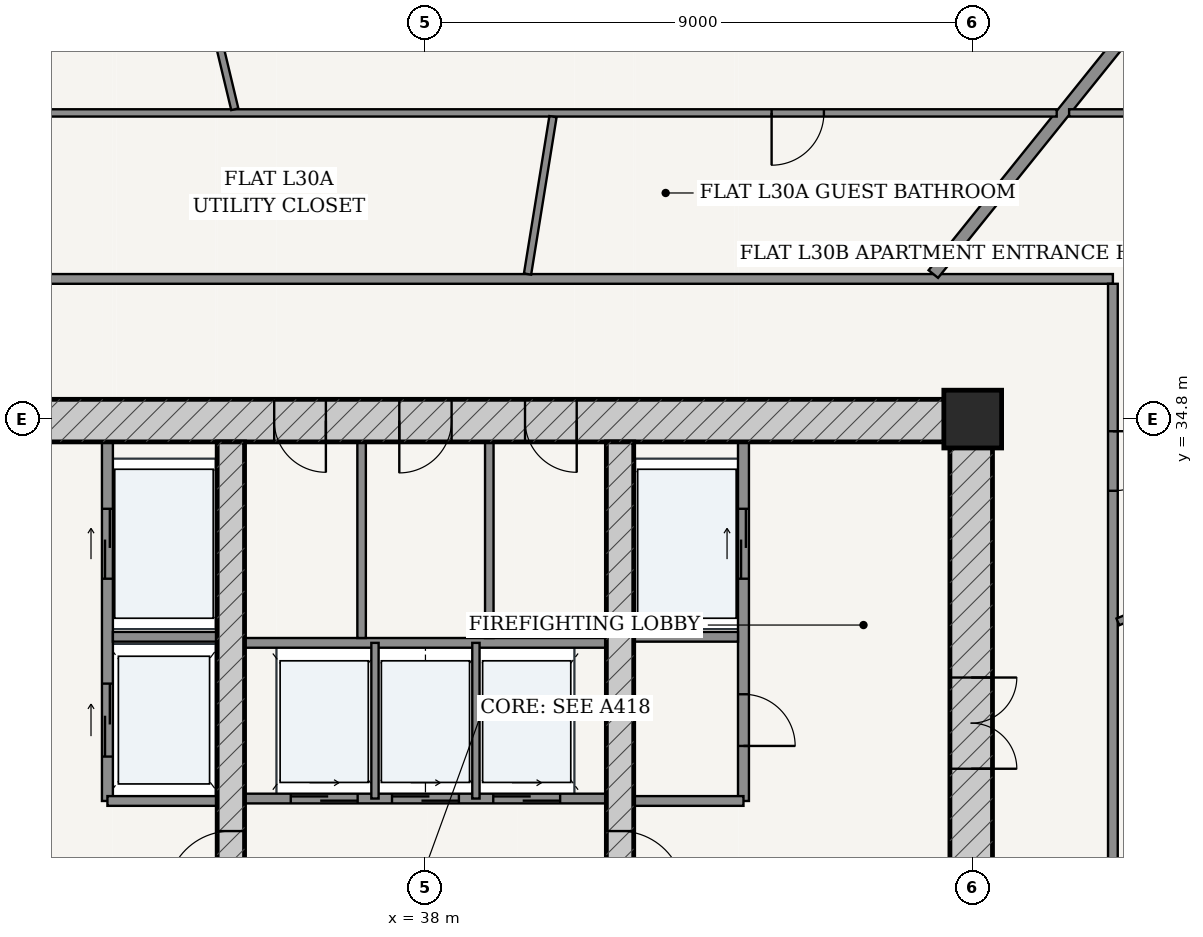
"""IFC4 building model, lengths in metres.
Left out: names, types, materials, properties, quantities, classifications, styles, units other than length and angle.
Written with IfcOpenShell. Run it as: python <this file> out.ifc"""

import sys

from ifc_helpers import new_model, si_unit, direction, frame, frame_2d, origin, origin_2d, place, context, subcontext, project, spatial, rectangle, extrude, source, transform, mapped, element, fill, save


model = new_model("IFC4")
c1 = context("Model", 3, precision=1e-05, world=origin(), true_north=direction((-0.2419218956, 0.970295726276)))
c2 = subcontext(c1, "Body", "Model", "MODEL_VIEW")
j1 = project(units=[si_unit("LENGTHUNIT", "METRE"), si_unit("PLANEANGLEUNIT", "RADIAN")], contexts=[c1])
p1 = place(None, origin())
s1 = spatial("IfcSite", under=j1, at=p1, CompositionType="ELEMENT")
p2 = place(p1, origin())
s2 = spatial("IfcBuilding", under=s1, at=p2, CompositionType="ELEMENT")
p3 = place(p2, frame((0.0, 0.0, 115.8)))
s3 = spatial("IfcBuildingStorey", under=s2, at=p3, CompositionType="ELEMENT", Elevation=115.8)
p4 = place(p3, frame((47.0, 34.8, 0.0), z_axis=(0.0, 0.0, 1.0), x_axis=(1.0, 0.0, 0.0)))
e1 = element("IfcColumn", 1, at=p4, inside=s3, PredefinedType="COLUMN", context=c2, shape_type="SweptSolid", body=[
    extrude(rectangle(XDim=0.95, YDim=0.95, at=origin_2d()), origin(), (0.0, 0.0, 1.0), 3.6),
])
p5 = place(p3, frame((28.675, 34.775, 0.0), z_axis=(0.0, 0.0, 1.0), x_axis=(1.0, 0.0, 0.0)))
e2 = element("IfcWall", 2, at=p5, inside=s3, PredefinedType="SHEAR", context=c2, shape_type="SweptSolid", body=[
    extrude(rectangle(XDim=18.65, YDim=0.7, at=frame_2d((9.325, 0.0))), origin(), (0.0, 0.0, 1.0), 3.325),
])
p6 = place(p5, frame((6.837, 0.0, 0.0)))
e3 = element("IfcOpeningElement", 3, at=p6, cuts=e2, PredefinedType="OPENING", context=c2, shape_type="SweptSolid", body=[
    extrude(rectangle(XDim=0.85, YDim=2.1, at=frame_2d((0.425, 1.05))), frame((0.0, 0.36, 0.0), z_axis=(0.0, -1.0, 0.0), x_axis=(1.0, 0.0, 0.0)), (0.0, 0.0, 1.0), 0.72),
])
p7 = place(p5, frame((8.895, 0.0, 0.0)))
e4 = element("IfcOpeningElement", 4, at=p7, cuts=e2, PredefinedType="OPENING", context=c2, shape_type="SweptSolid", body=[
    extrude(rectangle(XDim=0.86, YDim=2.1, at=frame_2d((0.43, 1.05))), frame((0.0, 0.36, 0.0), z_axis=(0.0, -1.0, 0.0), x_axis=(1.0, 0.0, 0.0)), (0.0, 0.0, 1.0), 0.72),
])
p8 = place(p5, frame((10.962, 0.0, 0.0)))
e5 = element("IfcOpeningElement", 5, at=p8, cuts=e2, PredefinedType="OPENING", context=c2, shape_type="SweptSolid", body=[
    extrude(rectangle(XDim=0.85, YDim=2.1, at=frame_2d((0.425, 1.05))), frame((0.0, 0.36, 0.0), z_axis=(0.0, -1.0, 0.0), x_axis=(1.0, 0.0, 0.0)), (0.0, 0.0, 1.0), 0.72),
])
p9 = place(p3, frame((46.975, 19.175, 0.0), z_axis=(0.0, 0.0, 1.0), x_axis=(0.0, 1.0, 0.0)))
e6 = element("IfcWall", 6, at=p9, inside=s3, PredefinedType="SHEAR", context=c2, shape_type="SweptSolid", body=[
    extrude(rectangle(XDim=15.25, YDim=0.7, at=frame_2d((7.625, 0.0))), origin(), (0.0, 0.0, 1.0), 3.325),
])
p10 = place(p9, frame((9.875, 0.0, 0.0)))
e7 = element("IfcOpeningElement", 7, at=p10, cuts=e6, PredefinedType="OPENING", context=c2, shape_type="SweptSolid", body=[
    extrude(rectangle(XDim=1.5, YDim=2.2, at=frame_2d((0.75, 1.1))), frame((0.0, 0.36, 0.0), z_axis=(0.0, -1.0, 0.0), x_axis=(1.0, 0.0, 0.0)), (0.0, 0.0, 1.0), 0.72),
])
p11 = place(p3, frame((34.8, 19.175, 0.0), z_axis=(0.0, 0.0, 1.0), x_axis=(0.0, 1.0, 0.0)))
e8 = element("IfcWall", 8, at=p11, inside=s3, PredefinedType="SHEAR", context=c2, shape_type="SweptSolid", body=[
    extrude(rectangle(XDim=15.25, YDim=0.45, at=frame_2d((7.625, 0.0))), origin(), (0.0, 0.0, 1.0), 3.325),
])
p12 = place(p11, frame((7.8, 0.0, 0.0)))
e9 = element("IfcOpeningElement", 9, at=p12, cuts=e8, PredefinedType="OPENING", context=c2, shape_type="SweptSolid", body=[
    extrude(rectangle(XDim=1.05, YDim=2.15, at=frame_2d((0.525, 1.075))), frame((0.0, 0.235, 0.0), z_axis=(0.0, -1.0, 0.0), x_axis=(1.0, 0.0, 0.0)), (0.0, 0.0, 1.0), 0.47),
])
p13 = place(p3, frame((41.2, 19.175, 0.0), z_axis=(0.0, 0.0, 1.0), x_axis=(0.0, 1.0, 0.0)))
e10 = element("IfcWall", 10, at=p13, inside=s3, PredefinedType="SHEAR", context=c2, shape_type="SweptSolid", body=[
    extrude(rectangle(XDim=15.25, YDim=0.45, at=frame_2d((7.625, 0.0))), origin(), (0.0, 0.0, 1.0), 3.325),
])
p14 = place(p13, frame((7.8, 0.0, 0.0)))
e11 = element("IfcOpeningElement", 11, at=p14, cuts=e10, PredefinedType="OPENING", context=c2, shape_type="SweptSolid", body=[
    extrude(rectangle(XDim=1.05, YDim=2.15, at=frame_2d((0.525, 1.075))), frame((0.0, 0.235, 0.0), z_axis=(0.0, -1.0, 0.0), x_axis=(1.0, 0.0, 0.0)), (0.0, 0.0, 1.0), 0.47),
])
p15 = place(p3, frame((32.77, 28.52, 0.0), z_axis=(0.0, 0.0, 1.0), x_axis=(0.0, 1.0, 0.0)))
e12 = element("IfcWall", 12, at=p15, inside=s3, PredefinedType="PARTITIONING", context=c2, shape_type="SweptSolid", body=[
    extrude(rectangle(XDim=5.905, YDim=0.18, at=frame_2d((2.953, 0.0))), origin(), (0.0, 0.0, 1.0), 3.325),
])
p16 = place(p15, frame((3.655, 0.0, 0.0)))
e13 = element("IfcOpeningElement", 13, at=p16, cuts=e12, PredefinedType="OPENING", context=c2, shape_type="SweptSolid", body=[
    extrude(rectangle(XDim=1.15, YDim=2.2, at=frame_2d((0.575, 1.1))), frame((0.0, 0.1, 0.0), z_axis=(0.0, -1.0, 0.0), x_axis=(1.0, 0.0, 0.0)), (0.0, 0.0, 1.0), 0.2),
])
p17 = place(p15, frame((0.73, 0.0, 0.0)))
e14 = element("IfcOpeningElement", 14, at=p17, cuts=e12, PredefinedType="OPENING", context=c2, shape_type="SweptSolid", body=[
    extrude(rectangle(XDim=1.2, YDim=2.25, at=frame_2d((0.6, 1.125))), frame((0.0, 0.1, 0.0), z_axis=(0.0, -1.0, 0.0), x_axis=(1.0, 0.0, 0.0)), (0.0, 0.0, 1.0), 0.2),
])
p18 = place(p3, frame((32.86, 31.22, 0.0), z_axis=(0.0, 0.0, 1.0), x_axis=(1.0, 0.0, 0.0)))
e15 = element("IfcWall", 15, at=p18, inside=s3, PredefinedType="PARTITIONING", context=c2, shape_type="SweptSolid", body=[
    extrude(rectangle(XDim=1.715, YDim=0.16, at=frame_2d((0.857, 0.0))), origin(), (0.0, 0.0, 1.0), 3.325),
])
p19 = place(p3, frame((32.77, 28.52, 0.0), z_axis=(0.0, 0.0, 1.0), x_axis=(1.0, 0.0, 0.0)))
e16 = element("IfcWall", 16, at=p19, inside=s3, PredefinedType="PARTITIONING", context=c2, shape_type="SweptSolid", body=[
    extrude(rectangle(XDim=1.805, YDim=0.16, at=frame_2d((0.902, 0.0))), origin(), (0.0, 0.0, 1.0), 3.325),
])
p20 = place(p3, frame((43.23, 28.52, 0.0), z_axis=(0.0, 0.0, 1.0), x_axis=(0.0, 1.0, 0.0)))
e17 = element("IfcWall", 17, at=p20, inside=s3, PredefinedType="PARTITIONING", context=c2, shape_type="SweptSolid", body=[
    extrude(rectangle(XDim=5.905, YDim=0.18, at=frame_2d((2.953, 0.0))), origin(), (0.0, 0.0, 1.0), 3.325),
])
p21 = place(p20, frame((0.905, 0.0, 0.0)))
e18 = element("IfcOpeningElement", 18, at=p21, cuts=e17, PredefinedType="OPENING", context=c2, shape_type="SweptSolid", body=[
    extrude(rectangle(XDim=0.85, YDim=2.1, at=frame_2d((0.425, 1.05))), frame((0.0, 0.1, 0.0), z_axis=(0.0, -1.0, 0.0), x_axis=(1.0, 0.0, 0.0)), (0.0, 0.0, 1.0), 0.2),
])
p22 = place(p20, frame((3.655, 0.0, 0.0)))
e19 = element("IfcOpeningElement", 19, at=p22, cuts=e17, PredefinedType="OPENING", context=c2, shape_type="SweptSolid", body=[
    extrude(rectangle(XDim=1.15, YDim=2.2, at=frame_2d((0.575, 1.1))), frame((0.0, 0.1, 0.0), z_axis=(0.0, -1.0, 0.0), x_axis=(1.0, 0.0, 0.0)), (0.0, 0.0, 1.0), 0.2),
])
p23 = place(p3, frame((41.425, 31.22, 0.0), z_axis=(0.0, 0.0, 1.0), x_axis=(1.0, 0.0, 0.0)))
e20 = element("IfcWall", 20, at=p23, inside=s3, PredefinedType="PARTITIONING", context=c2, shape_type="SweptSolid", body=[
    extrude(rectangle(XDim=1.715, YDim=0.16, at=frame_2d((0.857, 0.0))), origin(), (0.0, 0.0, 1.0), 3.325),
])
p24 = place(p3, frame((41.425, 28.52, 0.0), z_axis=(0.0, 0.0, 1.0), x_axis=(1.0, 0.0, 0.0)))
e21 = element("IfcWall", 21, at=p24, inside=s3, PredefinedType="PARTITIONING", context=c2, shape_type="SweptSolid", body=[
    extrude(rectangle(XDim=1.805, YDim=0.16, at=frame_2d((0.902, 0.0))), origin(), (0.0, 0.0, 1.0), 3.325),
])
p25 = place(p3, frame((35.025, 28.56, 0.0), z_axis=(0.0, 0.0, 1.0), x_axis=(1.0, 0.0, 0.0)))
e22 = element("IfcWall", 22, at=p25, inside=s3, PredefinedType="PARTITIONING", context=c2, shape_type="SweptSolid", body=[
    extrude(rectangle(XDim=5.95, YDim=0.16, at=frame_2d((2.975, 0.0))), origin(), (0.0, 0.0, 1.0), 3.325),
])
p26 = place(p25, frame((0.76, 0.0, 0.0)))
e23 = element("IfcOpeningElement", 23, at=p26, cuts=e22, PredefinedType="OPENING", context=c2, shape_type="SweptSolid", body=[
    extrude(rectangle(XDim=1.1, YDim=2.2, at=frame_2d((0.55, 1.1))), frame((0.0, 0.09, 0.0), z_axis=(0.0, -1.0, 0.0), x_axis=(1.0, 0.0, 0.0)), (0.0, 0.0, 1.0), 0.18),
])
p27 = place(p25, frame((2.425, 0.0, 0.0)))
e24 = element("IfcOpeningElement", 24, at=p27, cuts=e22, PredefinedType="OPENING", context=c2, shape_type="SweptSolid", body=[
    extrude(rectangle(XDim=1.1, YDim=2.2, at=frame_2d((0.55, 1.1))), frame((0.0, 0.09, 0.0), z_axis=(0.0, -1.0, 0.0), x_axis=(1.0, 0.0, 0.0)), (0.0, 0.0, 1.0), 0.18),
])
p28 = place(p25, frame((4.09, 0.0, 0.0)))
e25 = element("IfcOpeningElement", 25, at=p28, cuts=e22, PredefinedType="OPENING", context=c2, shape_type="SweptSolid", body=[
    extrude(rectangle(XDim=1.1, YDim=2.2, at=frame_2d((0.55, 1.1))), frame((0.0, 0.09, 0.0), z_axis=(0.0, -1.0, 0.0), x_axis=(1.0, 0.0, 0.0)), (0.0, 0.0, 1.0), 0.18),
])
p29 = place(p3, frame((35.025, 31.12, 0.0), z_axis=(0.0, 0.0, 1.0), x_axis=(1.0, 0.0, 0.0)))
e26 = element("IfcWall", 26, at=p29, inside=s3, PredefinedType="PARTITIONING", context=c2, shape_type="SweptSolid", body=[
    extrude(rectangle(XDim=5.95, YDim=0.16, at=frame_2d((2.975, 0.0))), origin(), (0.0, 0.0, 1.0), 3.325),
])
for number, where, z_axis, x_axis in (
    (27, (37.17, 28.56, 0.0), (0.0, 0.0, 1.0), (0.0, 1.0, 0.0)),
    (28, (38.83, 28.56, 0.0), (0.0, 0.0, 1.0), (0.0, 1.0, 0.0)),
):
    element("IfcWall", number, at=place(p3, frame(where, z_axis=z_axis, x_axis=x_axis)), inside=s3, PredefinedType="PARTITIONING", context=c2, shape_type="SweptSolid", body=[
        extrude(rectangle(XDim=2.56, YDim=0.12, at=frame_2d((1.28, 0.0))), origin(), (0.0, 0.0, 1.0), 3.325),
    ])
for number, where, z_axis, x_axis in (
    (29, (36.95, 31.2, 0.0), (0.0, 0.0, 1.0), (0.0, 1.0, 0.0)),
    (30, (39.05, 31.2, 0.0), (0.0, 0.0, 1.0), (0.0, 1.0, 0.0)),
):
    element("IfcWall", number, at=place(p3, frame(where, z_axis=z_axis, x_axis=x_axis)), inside=s3, PredefinedType="PARTITIONING", context=c2, shape_type="SweptSolid", body=[
        extrude(rectangle(XDim=3.225, YDim=0.14, at=frame_2d((1.613, 0.0))), origin(), (0.0, 0.0, 1.0), 3.325),
    ])
p30 = place(p3, frame((26.695, 37.105, 0.0), z_axis=(0.0, 0.0, 1.0), x_axis=(1.0, 0.0, 0.0)))
e31 = element("IfcWall", 31, at=p30, inside=s3, PredefinedType="PARTITIONING", context=c2, shape_type="SweptSolid", body=[
    extrude(rectangle(XDim=22.61, YDim=0.16, at=frame_2d((11.305, 0.0))), origin(), (0.0, 0.0, 1.0), 2.767),
])
p31 = place(p3, frame((49.305, 16.575, 0.0), z_axis=(0.0, 0.0, 1.0), x_axis=(0.0, 1.0, 0.0)))
e32 = element("IfcWall", 32, at=p31, inside=s3, PredefinedType="PARTITIONING", context=c2, shape_type="SweptSolid", body=[
    extrude(rectangle(XDim=20.45, YDim=0.16, at=frame_2d((10.225, 0.0))), origin(), (0.0, 0.0, 1.0), 2.767),
])
p32 = place(p31, frame((17.046, 0.0, 0.0)))
e33 = element("IfcOpeningElement", 33, at=p32, cuts=e32, PredefinedType="OPENING", context=c2, shape_type="SweptSolid", body=[
    extrude(rectangle(XDim=0.98, YDim=2.2, at=frame_2d((0.49, 1.1))), frame((0.0, 0.09, 0.0), z_axis=(0.0, -1.0, 0.0), x_axis=(1.0, 0.0, 0.0)), (0.0, 0.0, 1.0), 0.18),
])
p33 = place(p3, frame((46.352, 37.185, 0.0), z_axis=(0.0, 0.0, 1.0), x_axis=(0.626712884514, 0.779250255299, 0.0)))
e34 = element("IfcWall", 34, at=p33, inside=s3, PredefinedType="PARTITIONING", context=c2, shape_type="SweptSolid", body=[
    extrude(rectangle(XDim=10.141, YDim=0.2, at=frame_2d((5.07, 0.0))), origin(), (0.0, 0.0, 1.0), 2.767),
])
p34 = place(p3, frame((23.965, 39.835, 0.0), z_axis=(0.0, 0.0, 1.0), x_axis=(1.0, 0.0, 0.0)))
e35 = element("IfcWall", 35, at=p34, inside=s3, PredefinedType="PARTITIONING", context=c2, shape_type="SweptSolid", body=[
    extrude(rectangle(XDim=24.416, YDim=0.12, at=frame_2d((12.208, 0.0))), origin(), (0.0, 0.0, 1.0), 2.767),
])
p35 = place(p34, frame((4.192, 0.0, 0.0)))
e36 = element("IfcOpeningElement", 36, at=p35, cuts=e35, PredefinedType="OPENING", context=c2, shape_type="SweptSolid", body=[
    extrude(rectangle(XDim=0.9, YDim=2.15, at=frame_2d((0.45, 1.075))), frame((0.0, 0.07, 0.0), z_axis=(0.0, -1.0, 0.0), x_axis=(1.0, 0.0, 0.0)), (0.0, 0.0, 1.0), 0.14),
])
p36 = place(p34, frame((19.728, 0.0, 0.0)))
e37 = element("IfcOpeningElement", 37, at=p36, cuts=e35, PredefinedType="OPENING", context=c2, shape_type="SweptSolid", body=[
    extrude(rectangle(XDim=0.86, YDim=2.15, at=frame_2d((0.43, 1.075))), frame((0.0, 0.07, 0.0), z_axis=(0.0, -1.0, 0.0), x_axis=(1.0, 0.0, 0.0)), (0.0, 0.0, 1.0), 0.14),
])
p37 = place(p3, frame((34.865, 39.895, 0.0), z_axis=(0.0, 0.0, 1.0), x_axis=(-0.23282725047, 0.97251810854, 0.0)))
e38 = element("IfcWall", 38, at=p37, inside=s3, PredefinedType="PARTITIONING", context=c2, shape_type="SweptSolid", body=[
    extrude(rectangle(XDim=8.715, YDim=0.12, at=frame_2d((4.357, 0.0))), origin(), (0.0, 0.0, 1.0), 2.767),
])
p38 = place(p37, frame((2.831, 0.0, 0.0)))
e39 = element("IfcOpeningElement", 39, at=p38, cuts=e38, PredefinedType="OPENING", context=c2, shape_type="SweptSolid", body=[
    extrude(rectangle(XDim=0.9, YDim=2.15, at=frame_2d((0.45, 1.075))), frame((0.0, 0.07, 0.0), z_axis=(0.0, -1.0, 0.0), x_axis=(1.0, 0.0, 0.0)), (0.0, 0.0, 1.0), 0.14),
])
p39 = place(p3, frame((39.679, 37.185, 0.0), z_axis=(0.0, 0.0, 1.0), x_axis=(0.159580767408, 0.98718487563, 0.0)))
e40 = element("IfcWall", 40, at=p39, inside=s3, PredefinedType="PARTITIONING", context=c2, shape_type="SweptSolid", body=[
    extrude(rectangle(XDim=2.622, YDim=0.12, at=frame_2d((1.311, 0.0))), origin(), (0.0, 0.0, 1.0), 3.325),
])
p40 = place(p3, frame((48.585, 39.835, 0.0), z_axis=(0.0, 0.0, 1.0), x_axis=(1.0, 0.0, 0.0)))
e41 = element("IfcWall", 41, at=p40, inside=s3, PredefinedType="PARTITIONING", context=c2, shape_type="SweptSolid", body=[
    extrude(rectangle(XDim=3.45, YDim=0.12, at=frame_2d((1.725, 0.0))), origin(), (0.0, 0.0, 1.0), 2.767),
])
p41 = place(p3, frame((49.387, 31.465, 0.0), z_axis=(0.0, 0.0, 1.0), x_axis=(0.925328713836, 0.37916588896, 0.0)))
e42 = element("IfcWall", 42, at=p41, inside=s3, PredefinedType="PARTITIONING", context=c2, shape_type="SweptSolid", body=[
    extrude(rectangle(XDim=2.8, YDim=0.12, at=frame_2d((1.4, 0.0))), origin(), (0.0, 0.0, 1.0), 3.325),
])
p42 = place(p41, frame((0.97, 0.0, 0.0)))
e43 = element("IfcOpeningElement", 43, at=p42, cuts=e42, PredefinedType="OPENING", context=c2, shape_type="SweptSolid", body=[
    extrude(rectangle(XDim=0.86, YDim=2.15, at=frame_2d((0.43, 1.075))), frame((0.0, 0.07, 0.0), z_axis=(0.0, -1.0, 0.0), x_axis=(1.0, 0.0, 0.0)), (0.0, 0.0, 1.0), 0.14),
])
m1 = source(origin(), c2, "Body", "SweptSolid", [
    extrude(rectangle(XDim=1.5, YDim=2.2, at=frame_2d((0.75, 1.1))), frame((0.0, 0.025, 0.0), z_axis=(0.0, -1.0, 0.0), x_axis=(1.0, 0.0, 0.0)), (0.0, 0.0, 1.0), 0.05),
])
p43 = place(p10, frame((1.5, 0.0, 0.0), z_axis=(0.0, 0.0, 1.0), x_axis=(-1.0, 0.0, 0.0)))
e44 = element("IfcDoor", 44, at=p43, inside=s3, OperationType="DOUBLE_DOOR_SINGLE_SWING", PredefinedType="DOOR", context=c2, shape_type="MappedRepresentation", body=[
    mapped(m1, transform((0.0, 0.0, 0.0), scale=1.0)),
])
fill(e7, e44)
m2 = source(origin(), c2, "Body", "SweptSolid", [
    extrude(rectangle(XDim=1.05, YDim=2.15, at=frame_2d((0.525, 1.075))), frame((0.0, 0.025, 0.0), z_axis=(0.0, -1.0, 0.0), x_axis=(1.0, 0.0, 0.0)), (0.0, 0.0, 1.0), 0.05),
])
p44 = place(p12, origin())
e45 = element("IfcDoor", 45, at=p44, inside=s3, OperationType="SINGLE_SWING_LEFT", PredefinedType="DOOR", context=c2, shape_type="MappedRepresentation", body=[
    mapped(m2, transform((0.0, 0.0, 0.0), scale=1.0)),
])
fill(e9, e45)
p45 = place(p14, frame((1.05, 0.0, 0.0), z_axis=(0.0, 0.0, 1.0), x_axis=(-1.0, 0.0, 0.0)))
e46 = element("IfcDoor", 46, at=p45, inside=s3, OperationType="SINGLE_SWING_RIGHT", PredefinedType="DOOR", context=c2, shape_type="MappedRepresentation", body=[
    mapped(m2, transform((0.0, 0.0, 0.0), scale=1.0)),
])
fill(e11, e46)
m3 = source(origin(), c2, "Body", "SweptSolid", [
    extrude(rectangle(XDim=0.85, YDim=2.1, at=frame_2d((0.425, 1.05))), frame((0.0, 0.025, 0.0), z_axis=(0.0, -1.0, 0.0), x_axis=(1.0, 0.0, 0.0)), (0.0, 0.0, 1.0), 0.05),
])
p46 = place(p21, frame((0.85, 0.0, 0.0), z_axis=(0.0, 0.0, 1.0), x_axis=(-1.0, 0.0, 0.0)))
e47 = element("IfcDoor", 47, at=p46, inside=s3, OperationType="SINGLE_SWING_RIGHT", PredefinedType="DOOR", context=c2, shape_type="MappedRepresentation", body=[
    mapped(m3, transform((0.0, 0.0, 0.0), scale=1.0)),
])
fill(e18, e47)
p47 = place(p6, frame((0.85, 0.0, 0.0), z_axis=(0.0, 0.0, 1.0), x_axis=(-1.0, 0.0, 0.0)))
e48 = element("IfcDoor", 48, at=p47, inside=s3, OperationType="SINGLE_SWING_LEFT", PredefinedType="DOOR", context=c2, shape_type="MappedRepresentation", body=[
    mapped(m3, transform((0.0, 0.0, 0.0), scale=1.0)),
])
fill(e3, e48)
m4 = source(origin(), c2, "Body", "SweptSolid", [
    extrude(rectangle(XDim=0.86, YDim=2.1, at=frame_2d((0.43, 1.05))), frame((0.0, 0.025, 0.0), z_axis=(0.0, -1.0, 0.0), x_axis=(1.0, 0.0, 0.0)), (0.0, 0.0, 1.0), 0.05),
])
p48 = place(p7, frame((0.86, 0.0, 0.0), z_axis=(0.0, 0.0, 1.0), x_axis=(-1.0, 0.0, 0.0)))
e49 = element("IfcDoor", 49, at=p48, inside=s3, OperationType="SINGLE_SWING_RIGHT", PredefinedType="DOOR", context=c2, shape_type="MappedRepresentation", body=[
    mapped(m4, transform((0.0, 0.0, 0.0), scale=1.0)),
])
fill(e4, e49)
p49 = place(p8, frame((0.85, 0.0, 0.0), z_axis=(0.0, 0.0, 1.0), x_axis=(-1.0, 0.0, 0.0)))
e50 = element("IfcDoor", 50, at=p49, inside=s3, OperationType="SINGLE_SWING_LEFT", PredefinedType="DOOR", context=c2, shape_type="MappedRepresentation", body=[
    mapped(m3, transform((0.0, 0.0, 0.0), scale=1.0)),
])
fill(e5, e50)
m5 = source(origin(), c2, "Body", "SweptSolid", [
    extrude(rectangle(XDim=1.15, YDim=2.2, at=frame_2d((0.575, 1.1))), frame((0.0, 0.025, 0.0), z_axis=(0.0, -1.0, 0.0), x_axis=(1.0, 0.0, 0.0)), (0.0, 0.0, 1.0), 0.05),
])
p50 = place(p16, origin())
e51 = element("IfcDoor", 51, at=p50, inside=s3, OperationType="DOUBLE_DOOR_SLIDING", PredefinedType="DOOR", context=c2, shape_type="MappedRepresentation", body=[
    mapped(m5, transform((0.0, 0.0, 0.0), scale=1.0)),
])
fill(e13, e51)
p51 = place(p22, origin())
e52 = element("IfcDoor", 52, at=p51, inside=s3, OperationType="DOUBLE_DOOR_SLIDING", PredefinedType="DOOR", context=c2, shape_type="MappedRepresentation", body=[
    mapped(m5, transform((0.0, 0.0, 0.0), scale=1.0)),
])
fill(e19, e52)
m6 = source(origin(), c2, "Body", "SweptSolid", [
    extrude(rectangle(XDim=1.2, YDim=2.25, at=frame_2d((0.6, 1.125))), frame((0.0, 0.025, 0.0), z_axis=(0.0, -1.0, 0.0), x_axis=(1.0, 0.0, 0.0)), (0.0, 0.0, 1.0), 0.05),
])
p52 = place(p17, origin())
e53 = element("IfcDoor", 53, at=p52, inside=s3, OperationType="DOUBLE_DOOR_SLIDING", PredefinedType="DOOR", context=c2, shape_type="MappedRepresentation", body=[
    mapped(m6, transform((0.0, 0.0, 0.0), scale=1.0)),
])
fill(e14, e53)
m7 = source(origin(), c2, "Body", "SweptSolid", [
    extrude(rectangle(XDim=1.1, YDim=2.2, at=frame_2d((0.55, 1.1))), frame((0.0, 0.025, 0.0), z_axis=(0.0, -1.0, 0.0), x_axis=(1.0, 0.0, 0.0)), (0.0, 0.0, 1.0), 0.05),
])
p53 = place(p26, origin())
e54 = element("IfcDoor", 54, at=p53, inside=s3, OperationType="DOUBLE_DOOR_SLIDING", PredefinedType="DOOR", context=c2, shape_type="MappedRepresentation", body=[
    mapped(m7, transform((0.0, 0.0, 0.0), scale=1.0)),
])
fill(e23, e54)
p54 = place(p27, origin())
e55 = element("IfcDoor", 55, at=p54, inside=s3, OperationType="DOUBLE_DOOR_SLIDING", PredefinedType="DOOR", context=c2, shape_type="MappedRepresentation", body=[
    mapped(m7, transform((0.0, 0.0, 0.0), scale=1.0)),
])
fill(e24, e55)
p55 = place(p28, origin())
e56 = element("IfcDoor", 56, at=p55, inside=s3, OperationType="DOUBLE_DOOR_SLIDING", PredefinedType="DOOR", context=c2, shape_type="MappedRepresentation", body=[
    mapped(m7, transform((0.0, 0.0, 0.0), scale=1.0)),
])
fill(e25, e56)
m8 = source(origin(), c2, "Body", "SweptSolid", [
    extrude(rectangle(XDim=0.86, YDim=2.15, at=frame_2d((0.43, 1.075))), frame((0.0, 0.025, 0.0), z_axis=(0.0, -1.0, 0.0), x_axis=(1.0, 0.0, 0.0)), (0.0, 0.0, 1.0), 0.05),
])
p56 = place(p36, frame((0.86, 0.0, 0.0), z_axis=(0.0, 0.0, 1.0), x_axis=(-1.0, 0.0, 0.0)))
e57 = element("IfcDoor", 57, at=p56, inside=s3, OperationType="SINGLE_SWING_RIGHT", PredefinedType="DOOR", context=c2, shape_type="MappedRepresentation", body=[
    mapped(m8, transform((0.0, 0.0, 0.0), scale=1.0)),
])
fill(e37, e57)
m9 = source(origin(), c2, "Body", "SweptSolid", [
    extrude(rectangle(XDim=0.98, YDim=2.2, at=frame_2d((0.49, 1.1))), frame((0.0, 0.025, 0.0), z_axis=(0.0, -1.0, 0.0), x_axis=(1.0, 0.0, 0.0)), (0.0, 0.0, 1.0), 0.05),
])
p57 = place(p32, frame((0.98, 0.0, 0.0), z_axis=(0.0, 0.0, 1.0), x_axis=(-1.0, 0.0, 0.0)))
e58 = element("IfcDoor", 58, at=p57, inside=s3, OperationType="SINGLE_SWING_LEFT", PredefinedType="DOOR", context=c2, shape_type="MappedRepresentation", body=[
    mapped(m9, transform((0.0, 0.0, 0.0), scale=1.0)),
])
fill(e33, e58)
save(model, sys.argv[1])
